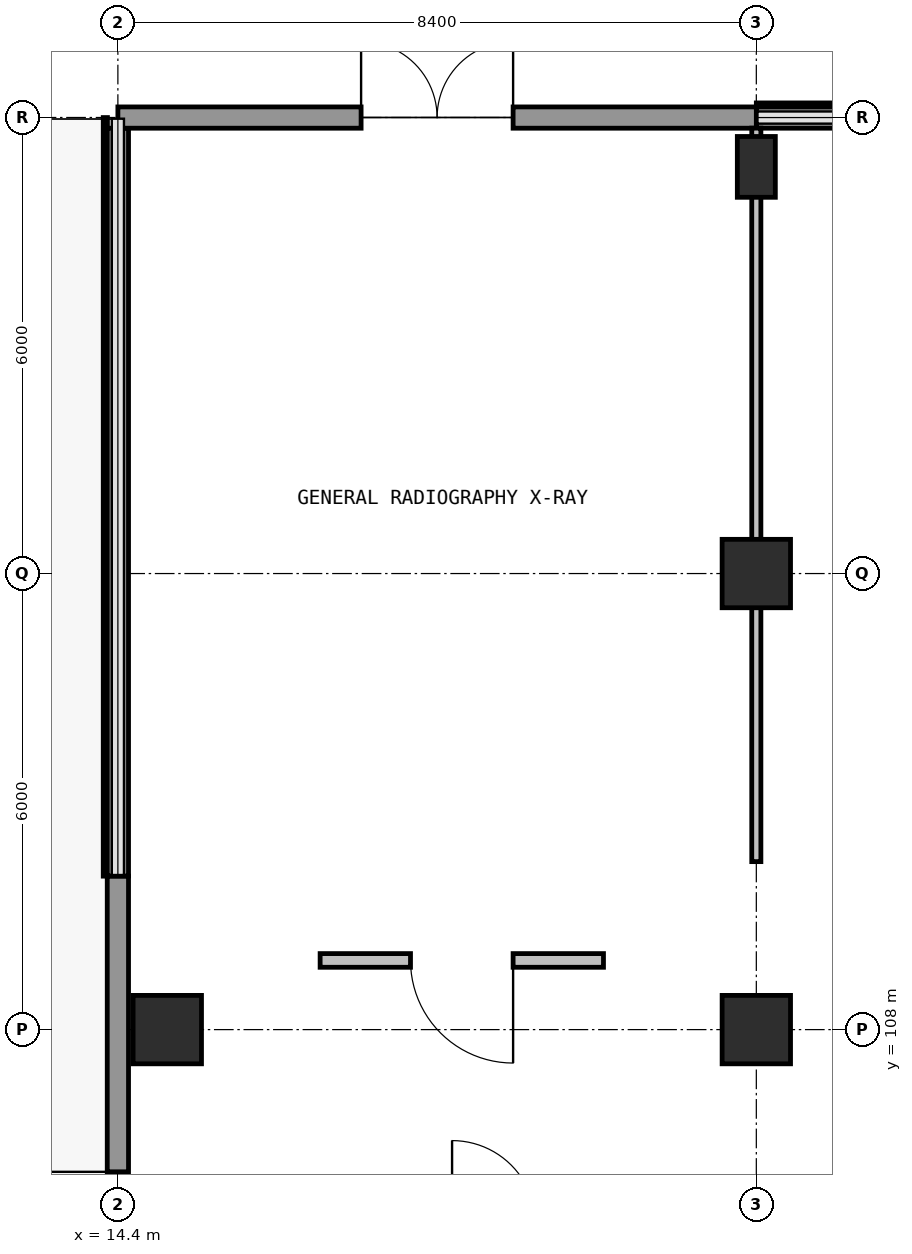
"""IFC4 building model, lengths in metres.
Left out: names, types, materials, properties, quantities, classifications, styles, units other than length and angle.
Written with IfcOpenShell. Run it as: python <this file> out.ifc"""

import sys

from ifc_helpers import new_model, si_unit, direction, frame, frame_2d, origin, origin_2d, place, context, subcontext, project, spatial, rectangle, extrude, element, fill, save


model = new_model("IFC4")
c1 = context("Model", 3, precision=1e-05, world=origin(), true_north=direction((0.0, 1.0)))
c2 = subcontext(c1, "Body", "Model", "MODEL_VIEW")
j1 = project(units=[si_unit("LENGTHUNIT", "METRE"), si_unit("PLANEANGLEUNIT", "RADIAN")], contexts=[c1])
p1 = place(None, origin())
s1 = spatial("IfcSite", under=j1, at=p1, CompositionType="ELEMENT")
p2 = place(p1, origin())
s2 = spatial("IfcBuilding", under=s1, at=p2, CompositionType="ELEMENT")
p3 = place(p2, origin())
s3 = spatial("IfcBuildingStorey", under=s2, at=p3, CompositionType="ELEMENT", Elevation=0.0)
for number, where, z_axis, x_axis in (
    (1, (15.05, 108.0, 0.0), (0.0, 0.0, 1.0), (1.0, 0.0, 0.0)),
    (2, (22.8, 108.0, 0.0), (0.0, 0.0, 1.0), (1.0, 0.0, 0.0)),
    (3, (22.8, 114.0, 0.0), (0.0, 0.0, 1.0), (1.0, 0.0, 0.0)),
):
    element("IfcColumn", number, at=place(p3, frame(where, z_axis=z_axis, x_axis=x_axis)), inside=s3, PredefinedType="COLUMN", context=c2, shape_type="SweptSolid", body=[
        extrude(rectangle(XDim=0.9, YDim=0.9, at=origin_2d()), origin(), (0.0, 0.0, 1.0), 5.4),
    ])
p4 = place(p3, frame((22.8, 119.35, 0.0), z_axis=(0.0, 0.0, 1.0), x_axis=(1.0, 0.0, 0.0)))
e4 = element("IfcColumn", 4, at=p4, inside=s3, PredefinedType="COLUMN", context=c2, shape_type="SweptSolid", body=[
    extrude(rectangle(XDim=0.5, YDim=0.8, at=origin_2d()), origin(), (0.0, 0.0, 1.0), 5.4),
])
p5 = place(p3, frame((14.4, 100.04, 0.0), z_axis=(0.0, 0.0, 1.0), x_axis=(0.0, 1.0, 0.0)))
e5 = element("IfcWall", 5, at=p5, inside=s3, PredefinedType="SOLIDWALL", context=c2, shape_type="SweptSolid", body=[
    extrude(rectangle(XDim=9.979, YDim=0.28, at=frame_2d((4.99, 0.0))), origin(), (0.0, 0.0, 1.0), 5.08),
])
p6 = place(p5, frame((3.889, 0.0, 0.0)))
e6 = element("IfcOpeningElement", 6, at=p6, cuts=e5, PredefinedType="OPENING", context=c2, shape_type="SweptSolid", body=[
    extrude(rectangle(XDim=2.2, YDim=2.35, at=frame_2d((1.1, 1.175))), frame((0.0, 0.15, 0.0), z_axis=(0.0, -1.0, 0.0), x_axis=(1.0, 0.0, 0.0)), (0.0, 0.0, 1.0), 0.3),
])
p7 = place(p3, frame((14.4, 110.021, 0.0), z_axis=(0.0, 0.0, 1.0), x_axis=(0.0, 1.0, 0.0)))
e7 = element("IfcWall", 7, at=p7, inside=s3, PredefinedType="SOLIDWALL", context=c2, shape_type="SweptSolid", body=[
    extrude(rectangle(XDim=9.838, YDim=0.28, at=frame_2d((4.919, 0.0))), origin(), (0.0, 0.0, 1.0), 0.94),
])
p8 = place(p3, frame((14.4, 119.999, 0.0), z_axis=(0.0, 0.0, 1.0), x_axis=(1.0, 0.0, 0.0)))
e8 = element("IfcWall", 8, at=p8, inside=s3, PredefinedType="SOLIDWALL", context=c2, shape_type="SweptSolid", body=[
    extrude(rectangle(XDim=8.4, YDim=0.28, at=frame_2d((4.2, 0.0))), origin(), (0.0, 0.0, 1.0), 5.08),
])
p9 = place(p8, frame((3.2, 0.0, 0.0)))
e9 = element("IfcOpeningElement", 9, at=p9, cuts=e8, PredefinedType="OPENING", context=c2, shape_type="SweptSolid", body=[
    extrude(rectangle(XDim=2.0, YDim=2.3, at=frame_2d((1.0, 1.15))), frame((0.0, 0.15, 0.0), z_axis=(0.0, -1.0, 0.0), x_axis=(1.0, 0.0, 0.0)), (0.0, 0.0, 1.0), 0.3),
])
p10 = place(p3, frame((22.802, 119.999, 0.0), z_axis=(0.0, 0.0, 1.0), x_axis=(1.0, 0.0, 0.0)))
e10 = element("IfcWall", 10, at=p10, inside=s3, PredefinedType="SOLIDWALL", context=c2, shape_type="SweptSolid", body=[
    extrude(rectangle(XDim=8.396, YDim=0.28, at=frame_2d((4.198, 0.0))), origin(), (0.0, 0.0, 1.0), 0.94),
])
p11 = place(p3, frame((22.8, 119.86, 0.0), z_axis=(0.0, 0.0, 1.0), x_axis=(0.0, -1.0, 0.0)))
e11 = element("IfcWall", 11, at=p11, inside=s3, PredefinedType="PARTITIONING", context=c2, shape_type="SweptSolid", body=[
    extrude(rectangle(XDim=9.65, YDim=0.12, at=frame_2d((4.825, 0.0))), origin(), (0.0, 0.0, 1.0), 4.33),
])
p12 = place(p3, frame((20.789, 108.91, 0.0), z_axis=(0.0, 0.0, 1.0), x_axis=(-1.0, 0.0, 0.0)))
e12 = element("IfcWall", 12, at=p12, inside=s3, PredefinedType="PARTITIONING", context=c2, shape_type="SweptSolid", body=[
    extrude(rectangle(XDim=3.728, YDim=0.18, at=frame_2d((1.864, 0.0))), origin(), (0.0, 0.0, 1.0), 5.08),
])
p13 = place(p12, frame((1.189, 0.0, 0.0)))
e13 = element("IfcOpeningElement", 13, at=p13, cuts=e12, PredefinedType="OPENING", context=c2, shape_type="SweptSolid", body=[
    extrude(rectangle(XDim=1.35, YDim=2.15, at=frame_2d((0.675, 1.075))), frame((0.0, 0.1, 0.0), z_axis=(0.0, -1.0, 0.0), x_axis=(1.0, 0.0, 0.0)), (0.0, 0.0, 1.0), 0.2),
])
p14 = place(p6, origin())
e14 = element("IfcDoor", 14, at=p14, inside=s3, OperationType="DOUBLE_DOOR_SINGLE_SWING", PredefinedType="DOOR", context=c2, shape_type="SweptSolid", body=[
    extrude(rectangle(XDim=2.2, YDim=2.35, at=frame_2d((1.1, 1.175))), frame((0.0, 0.025, 0.0), z_axis=(0.0, -1.0, 0.0), x_axis=(1.0, 0.0, 0.0)), (0.0, 0.0, 1.0), 0.05),
])
fill(e6, e14)
p15 = place(p9, origin())
e15 = element("IfcDoor", 15, at=p15, inside=s3, OperationType="DOUBLE_DOOR_SINGLE_SWING", PredefinedType="DOOR", context=c2, shape_type="SweptSolid", body=[
    extrude(rectangle(XDim=2.0, YDim=2.3, at=frame_2d((1.0, 1.15))), frame((0.0, 0.025, 0.0), z_axis=(0.0, -1.0, 0.0), x_axis=(1.0, 0.0, 0.0)), (0.0, 0.0, 1.0), 0.05),
])
fill(e9, e15)
p16 = place(p13, origin())
e16 = element("IfcDoor", 16, at=p16, inside=s3, OperationType="SINGLE_SWING_LEFT", PredefinedType="DOOR", context=c2, shape_type="SweptSolid", body=[
    extrude(rectangle(XDim=1.35, YDim=2.15, at=frame_2d((0.675, 1.075))), frame((0.0, 0.025, 0.0), z_axis=(0.0, -1.0, 0.0), x_axis=(1.0, 0.0, 0.0)), (0.0, 0.0, 1.0), 0.05),
])
fill(e13, e16)
save(model, sys.argv[1])
